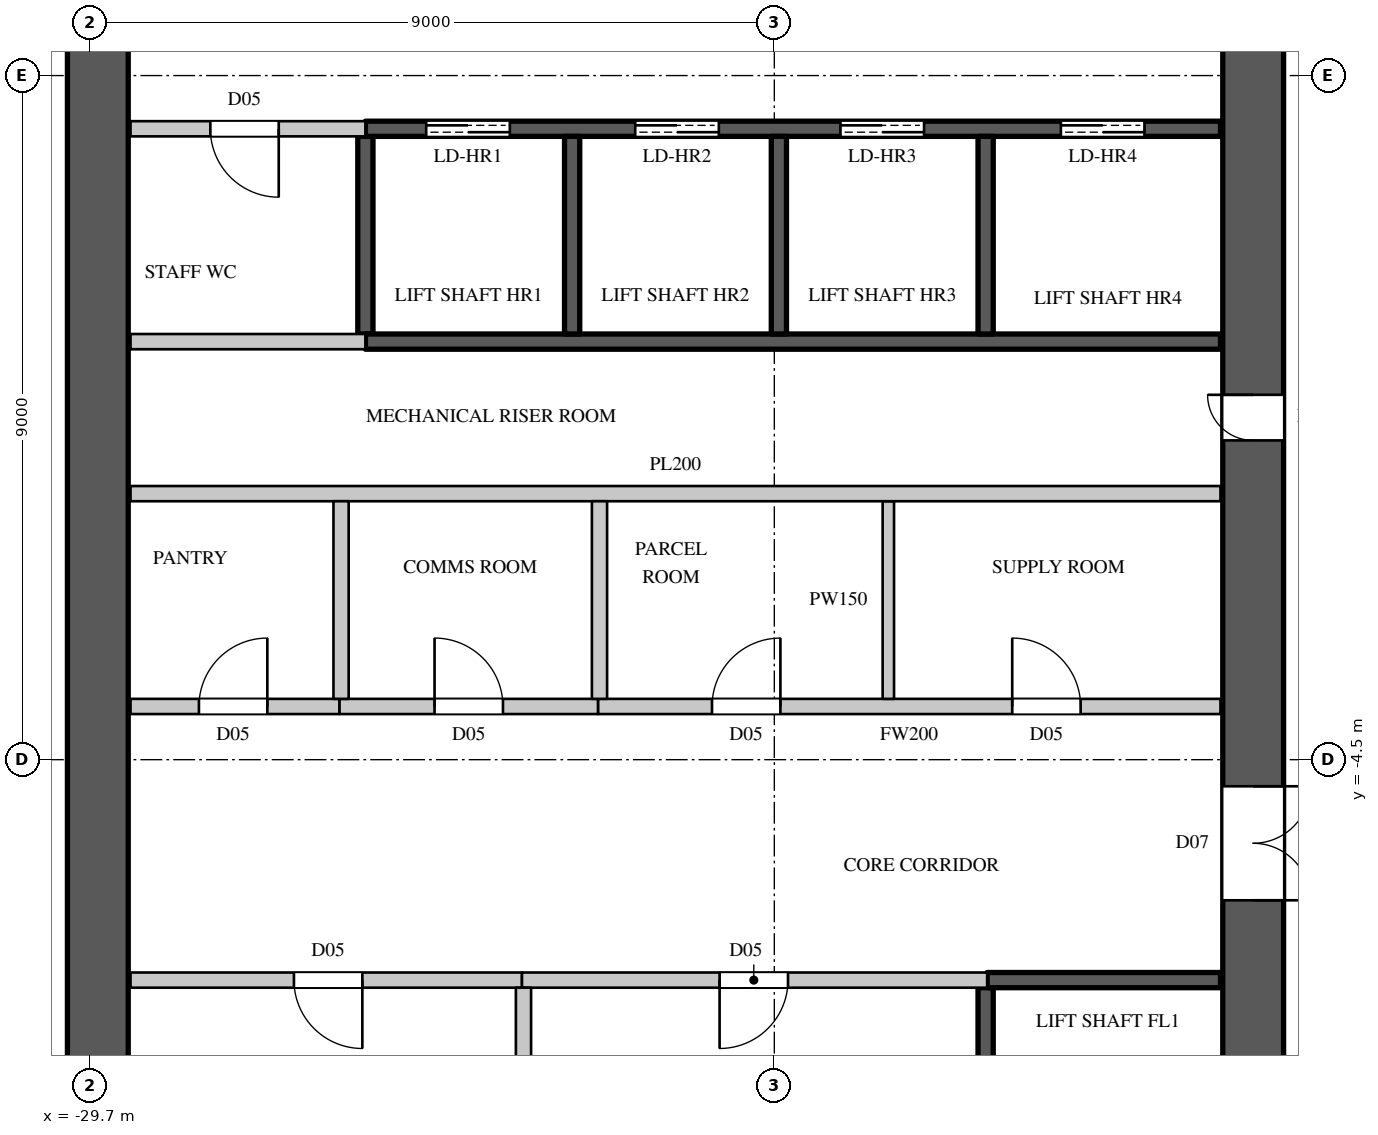
"""IFC4 building model, lengths in metres.
Left out: names, types, materials, properties, quantities, classifications, styles, units other than length and angle.
Written with IfcOpenShell. Run it as: python <this file> out.ifc"""

import sys

from ifc_helpers import new_model, si_unit, direction, frame, frame_2d, origin, place, context, subcontext, project, spatial, rectangle, extrude, element, fill, save


model = new_model("IFC4")
c1 = context("Model", 3, precision=1e-05, world=origin(), true_north=direction((0.0, 1.0)))
c2 = subcontext(c1, "Body", "Model", "MODEL_VIEW")
j1 = project(units=[si_unit("LENGTHUNIT", "METRE"), si_unit("PLANEANGLEUNIT", "RADIAN")], contexts=[c1])
p1 = place(None, origin())
s1 = spatial("IfcSite", under=j1, at=p1, CompositionType="ELEMENT")
p2 = place(p1, origin())
s2 = spatial("IfcBuilding", under=s1, at=p2, CompositionType="ELEMENT")
p3 = place(p2, frame((0.0, 0.0, 189.2)))
s3 = spatial("IfcBuildingStorey", under=s2, at=p3, CompositionType="ELEMENT", Elevation=189.2)
p4 = place(p3, frame((-14.4, -14.8, 0.0), z_axis=(0.0, 0.0, 1.0), x_axis=(0.0, 1.0, 0.0)))
e1 = element("IfcWall", 1, at=p4, inside=s3, PredefinedType="SHEAR", context=c2, shape_type="SweptSolid", body=[
    extrude(rectangle(XDim=29.6, YDim=0.8, at=frame_2d((14.8, 0.0))), origin(), (0.0, 0.0, 1.0), 4.1),
])
p5 = place(p4, frame((1.55, 0.0, 0.0)))
e2 = element("IfcOpeningElement", 2, at=p5, cuts=e1, PredefinedType="OPENING", context=c2, shape_type="SweptSolid", body=[
    extrude(rectangle(XDim=1.5, YDim=2.4, at=frame_2d((0.75, 1.2))), frame((0.0, 0.41, 0.0), z_axis=(0.0, -1.0, 0.0), x_axis=(1.0, 0.0, 0.0)), (0.0, 0.0, 1.0), 0.82),
])
p6 = place(p4, frame((26.55, 0.0, 0.0)))
e3 = element("IfcOpeningElement", 3, at=p6, cuts=e1, PredefinedType="OPENING", context=c2, shape_type="SweptSolid", body=[
    extrude(rectangle(XDim=1.5, YDim=2.4, at=frame_2d((0.75, 1.2))), frame((0.0, 0.41, 0.0), z_axis=(0.0, -1.0, 0.0), x_axis=(1.0, 0.0, 0.0)), (0.0, 0.0, 1.0), 0.82),
])
p7 = place(p4, frame((8.45, 0.0, 0.0)))
e4 = element("IfcOpeningElement", 4, at=p7, cuts=e1, PredefinedType="OPENING", context=c2, shape_type="SweptSolid", body=[
    extrude(rectangle(XDim=1.5, YDim=2.4, at=frame_2d((0.75, 1.2))), frame((0.0, 0.41, 0.0), z_axis=(0.0, -1.0, 0.0), x_axis=(1.0, 0.0, 0.0)), (0.0, 0.0, 1.0), 0.82),
])
p8 = place(p4, frame((19.65, 0.0, 0.0)))
e5 = element("IfcOpeningElement", 5, at=p8, cuts=e1, PredefinedType="OPENING", context=c2, shape_type="SweptSolid", body=[
    extrude(rectangle(XDim=1.5, YDim=2.4, at=frame_2d((0.75, 1.2))), frame((0.0, 0.41, 0.0), z_axis=(0.0, -1.0, 0.0), x_axis=(1.0, 0.0, 0.0)), (0.0, 0.0, 1.0), 0.82),
])
p9 = place(p4, frame((14.5, 0.0, 0.0)))
e6 = element("IfcOpeningElement", 6, at=p9, cuts=e1, PredefinedType="OPENING", context=c2, shape_type="SweptSolid", body=[
    extrude(rectangle(XDim=0.6, YDim=2.0, at=frame_2d((0.3, 1.0))), frame((0.0, 0.41, 0.0), z_axis=(0.0, -1.0, 0.0), x_axis=(1.0, 0.0, 0.0)), (0.0, 0.0, 1.0), 0.82),
])
p10 = place(p3, frame((-29.6, -10.2, 0.0), z_axis=(0.0, 0.0, 1.0), x_axis=(0.0, 1.0, 0.0)))
e7 = element("IfcWall", 7, at=p10, inside=s3, PredefinedType="SHEAR", context=c2, shape_type="SweptSolid", body=[
    extrude(rectangle(XDim=20.4, YDim=0.8, at=frame_2d((10.2, 0.0))), origin(), (0.0, 0.0, 1.0), 4.1),
])
p11 = place(p3, frame((-29.17, -7.4, 0.0), z_axis=(0.0, 0.0, 1.0), x_axis=(1.0, 0.0, 0.0)))
e8 = element("IfcWall", 8, at=p11, inside=s3, PredefinedType="PARTITIONING", context=c2, shape_type="SweptSolid", body=[
    extrude(rectangle(XDim=5.15, YDim=0.2, at=frame_2d((2.575, 0.0))), origin(), (0.0, 0.0, 1.0), 3.8),
])
p12 = place(p11, frame((2.15, 0.0, 0.0)))
e9 = element("IfcOpeningElement", 9, at=p12, cuts=e8, PredefinedType="OPENING", context=c2, shape_type="SweptSolid", body=[
    extrude(rectangle(XDim=0.9, YDim=2.2, at=frame_2d((0.45, 1.1))), frame((0.0, 0.11, 0.0), z_axis=(0.0, -1.0, 0.0), x_axis=(1.0, 0.0, 0.0)), (0.0, 0.0, 1.0), 0.22),
])
p13 = place(p3, frame((-29.17, -3.8, 0.0), z_axis=(0.0, 0.0, 1.0), x_axis=(1.0, 0.0, 0.0)))
e10 = element("IfcWall", 10, at=p13, inside=s3, PredefinedType="PARTITIONING", context=c2, shape_type="SweptSolid", body=[
    extrude(rectangle(XDim=2.75, YDim=0.2, at=frame_2d((1.375, 0.0))), origin(), (0.0, 0.0, 1.0), 3.8),
])
p14 = place(p13, frame((0.9, 0.0, 0.0)))
e11 = element("IfcOpeningElement", 11, at=p14, cuts=e10, PredefinedType="OPENING", context=c2, shape_type="SweptSolid", body=[
    extrude(rectangle(XDim=0.9, YDim=2.2, at=frame_2d((0.45, 1.1))), frame((0.0, 0.11, 0.0), z_axis=(0.0, -1.0, 0.0), x_axis=(1.0, 0.0, 0.0)), (0.0, 0.0, 1.0), 0.22),
])
p15 = place(p3, frame((-29.17, 3.8, 0.0), z_axis=(0.0, 0.0, 1.0), x_axis=(1.0, 0.0, 0.0)))
e12 = element("IfcWall", 12, at=p15, inside=s3, PredefinedType="PARTITIONING", context=c2, shape_type="SweptSolid", body=[
    extrude(rectangle(XDim=3.09, YDim=0.2, at=frame_2d((1.545, 0.0))), origin(), (0.0, 0.0, 1.0), 3.8),
])
p16 = place(p15, frame((1.05, 0.0, 0.0)))
e13 = element("IfcOpeningElement", 13, at=p16, cuts=e12, PredefinedType="OPENING", context=c2, shape_type="SweptSolid", body=[
    extrude(rectangle(XDim=0.9, YDim=2.2, at=frame_2d((0.45, 1.1))), frame((0.0, 0.11, 0.0), z_axis=(0.0, -1.0, 0.0), x_axis=(1.0, 0.0, 0.0)), (0.0, 0.0, 1.0), 0.22),
])
p17 = place(p3, frame((-23.02, -3.8, 0.0), z_axis=(0.0, 0.0, 1.0), x_axis=(1.0, 0.0, 0.0)))
e14 = element("IfcWall", 14, at=p17, inside=s3, PredefinedType="PARTITIONING", context=c2, shape_type="SweptSolid", body=[
    extrude(rectangle(XDim=8.19, YDim=0.2, at=frame_2d((4.095, 0.0))), origin(), (0.0, 0.0, 1.0), 3.8),
])
p18 = place(p17, frame((1.5, 0.0, 0.0)))
e15 = element("IfcOpeningElement", 15, at=p18, cuts=e14, PredefinedType="OPENING", context=c2, shape_type="SweptSolid", body=[
    extrude(rectangle(XDim=0.9, YDim=2.2, at=frame_2d((0.45, 1.1))), frame((0.0, 0.11, 0.0), z_axis=(0.0, -1.0, 0.0), x_axis=(1.0, 0.0, 0.0)), (0.0, 0.0, 1.0), 0.22),
])
p19 = place(p17, frame((5.45, 0.0, 0.0)))
e16 = element("IfcOpeningElement", 16, at=p19, cuts=e14, PredefinedType="OPENING", context=c2, shape_type="SweptSolid", body=[
    extrude(rectangle(XDim=0.9, YDim=2.2, at=frame_2d((0.45, 1.1))), frame((0.0, 0.11, 0.0), z_axis=(0.0, -1.0, 0.0), x_axis=(1.0, 0.0, 0.0)), (0.0, 0.0, 1.0), 0.22),
])
p20 = place(p3, frame((-19.2, -3.7, 0.0), z_axis=(0.0, 0.0, 1.0), x_axis=(0.0, 1.0, 0.0)))
e17 = element("IfcWall", 17, at=p20, inside=s3, PredefinedType="PARTITIONING", context=c2, shape_type="SweptSolid", body=[
    extrude(rectangle(XDim=2.6, YDim=0.15, at=frame_2d((1.3, 0.0))), origin(), (0.0, 0.0, 1.0), 3.8),
])
p21 = place(p3, frame((-29.17, -1.0, 0.0), z_axis=(0.0, 0.0, 1.0), x_axis=(1.0, 0.0, 0.0)))
e18 = element("IfcWall", 18, at=p21, inside=s3, PredefinedType="PARTITIONING", context=c2, shape_type="SweptSolid", body=[
    extrude(rectangle(XDim=14.34, YDim=0.2, at=frame_2d((7.17, 0.0))), origin(), (0.0, 0.0, 1.0), 3.8),
])
p22 = place(p3, frame((-29.17, 1.0, 0.0), z_axis=(0.0, 0.0, 1.0), x_axis=(1.0, 0.0, 0.0)))
e19 = element("IfcWall", 19, at=p22, inside=s3, PredefinedType="PARTITIONING", context=c2, shape_type="SweptSolid", body=[
    extrude(rectangle(XDim=3.09, YDim=0.2, at=frame_2d((1.545, 0.0))), origin(), (0.0, 0.0, 1.0), 3.8),
])
p23 = place(p3, frame((-26.42, -3.8, 0.0), z_axis=(0.0, 0.0, 1.0), x_axis=(1.0, 0.0, 0.0)))
e20 = element("IfcWall", 20, at=p23, inside=s3, PredefinedType="PARTITIONING", context=c2, shape_type="SweptSolid", body=[
    extrude(rectangle(XDim=3.4, YDim=0.2, at=frame_2d((1.7, 0.0))), origin(), (0.0, 0.0, 1.0), 3.8),
])
p24 = place(p23, frame((1.25, 0.0, 0.0)))
e21 = element("IfcOpeningElement", 21, at=p24, cuts=e20, PredefinedType="OPENING", context=c2, shape_type="SweptSolid", body=[
    extrude(rectangle(XDim=0.9, YDim=2.2, at=frame_2d((0.45, 1.1))), frame((0.0, 0.11, 0.0), z_axis=(0.0, -1.0, 0.0), x_axis=(1.0, 0.0, 0.0)), (0.0, 0.0, 1.0), 0.22),
])
p25 = place(p3, frame((-26.4, -3.7, 0.0), z_axis=(0.0, 0.0, 1.0), x_axis=(0.0, 1.0, 0.0)))
e22 = element("IfcWall", 22, at=p25, inside=s3, PredefinedType="PARTITIONING", context=c2, shape_type="SweptSolid", body=[
    extrude(rectangle(XDim=2.6, YDim=0.2, at=frame_2d((1.3, 0.0))), origin(), (0.0, 0.0, 1.0), 3.8),
])
p26 = place(p3, frame((-24.02, -7.4, 0.0), z_axis=(0.0, 0.0, 1.0), x_axis=(1.0, 0.0, 0.0)))
e23 = element("IfcWall", 23, at=p26, inside=s3, PredefinedType="PARTITIONING", context=c2, shape_type="SweptSolid", body=[
    extrude(rectangle(XDim=6.12, YDim=0.2, at=frame_2d((3.06, 0.0))), origin(), (0.0, 0.0, 1.0), 3.8),
])
p27 = place(p26, frame((2.6, 0.0, 0.0)))
e24 = element("IfcOpeningElement", 24, at=p27, cuts=e23, PredefinedType="OPENING", context=c2, shape_type="SweptSolid", body=[
    extrude(rectangle(XDim=0.9, YDim=2.2, at=frame_2d((0.45, 1.1))), frame((0.0, 0.11, 0.0), z_axis=(0.0, -1.0, 0.0), x_axis=(1.0, 0.0, 0.0)), (0.0, 0.0, 1.0), 0.22),
])
p28 = place(p3, frame((-24.0, -10.075, 0.0), z_axis=(0.0, 0.0, 1.0), x_axis=(0.0, 1.0, 0.0)))
e25 = element("IfcWall", 25, at=p28, inside=s3, PredefinedType="PARTITIONING", context=c2, shape_type="SweptSolid", body=[
    extrude(rectangle(XDim=2.575, YDim=0.2, at=frame_2d((1.288, 0.0))), origin(), (0.0, 0.0, 1.0), 3.8),
])
p29 = place(p3, frame((-23.0, -3.7, 0.0), z_axis=(0.0, 0.0, 1.0), x_axis=(0.0, 1.0, 0.0)))
e26 = element("IfcWall", 26, at=p29, inside=s3, PredefinedType="PARTITIONING", context=c2, shape_type="SweptSolid", body=[
    extrude(rectangle(XDim=2.6, YDim=0.2, at=frame_2d((1.3, 0.0))), origin(), (0.0, 0.0, 1.0), 3.8),
])
p30 = place(p3, frame((-26.08, 1.1, 0.0), z_axis=(0.0, 0.0, 1.0), x_axis=(0.0, 1.0, 0.0)))
e27 = element("IfcWall", 27, at=p30, inside=s3, PredefinedType="SHEAR", context=c2, shape_type="SweptSolid", body=[
    extrude(rectangle(XDim=2.6, YDim=0.2, at=frame_2d((1.3, 0.0))), origin(), (0.0, 0.0, 1.0), 3.8),
])
p31 = place(p3, frame((-26.08, 1.0, 0.0), z_axis=(0.0, 0.0, 1.0), x_axis=(1.0, 0.0, 0.0)))
e28 = element("IfcWall", 28, at=p31, inside=s3, PredefinedType="SHEAR", context=c2, shape_type="SweptSolid", body=[
    extrude(rectangle(XDim=11.25, YDim=0.2, at=frame_2d((5.625, 0.0))), origin(), (0.0, 0.0, 1.0), 3.8),
])
p32 = place(p3, frame((-26.08, 3.8, 0.0), z_axis=(0.0, 0.0, 1.0), x_axis=(1.0, 0.0, 0.0)))
e29 = element("IfcWall", 29, at=p32, inside=s3, PredefinedType="SHEAR", context=c2, shape_type="SweptSolid", body=[
    extrude(rectangle(XDim=11.25, YDim=0.2, at=frame_2d((5.625, 0.0))), origin(), (0.0, 0.0, 1.0), 3.8),
])
p33 = place(p32, frame((0.8, 0.0, 0.0)))
e30 = element("IfcOpeningElement", 30, at=p33, cuts=e29, PredefinedType="OPENING", context=c2, shape_type="SweptSolid", body=[
    extrude(rectangle(XDim=1.1, YDim=2.2, at=frame_2d((0.55, 1.1))), frame((0.0, 0.11, 0.0), z_axis=(0.0, -1.0, 0.0), x_axis=(1.0, 0.0, 0.0)), (0.0, 0.0, 1.0), 0.22),
])
p34 = place(p32, frame((3.55, 0.0, 0.0)))
e31 = element("IfcOpeningElement", 31, at=p34, cuts=e29, PredefinedType="OPENING", context=c2, shape_type="SweptSolid", body=[
    extrude(rectangle(XDim=1.1, YDim=2.2, at=frame_2d((0.55, 1.1))), frame((0.0, 0.11, 0.0), z_axis=(0.0, -1.0, 0.0), x_axis=(1.0, 0.0, 0.0)), (0.0, 0.0, 1.0), 0.22),
])
p35 = place(p32, frame((6.25, 0.0, 0.0)))
e32 = element("IfcOpeningElement", 32, at=p35, cuts=e29, PredefinedType="OPENING", context=c2, shape_type="SweptSolid", body=[
    extrude(rectangle(XDim=1.1, YDim=2.2, at=frame_2d((0.55, 1.1))), frame((0.0, 0.11, 0.0), z_axis=(0.0, -1.0, 0.0), x_axis=(1.0, 0.0, 0.0)), (0.0, 0.0, 1.0), 0.22),
])
p36 = place(p32, frame((9.15, 0.0, 0.0)))
e33 = element("IfcOpeningElement", 33, at=p36, cuts=e29, PredefinedType="OPENING", context=c2, shape_type="SweptSolid", body=[
    extrude(rectangle(XDim=1.1, YDim=2.2, at=frame_2d((0.55, 1.1))), frame((0.0, 0.11, 0.0), z_axis=(0.0, -1.0, 0.0), x_axis=(1.0, 0.0, 0.0)), (0.0, 0.0, 1.0), 0.22),
])
for number, where, z_axis, x_axis in (
    (34, (-23.36, 1.1, 0.0), (0.0, 0.0, 1.0), (0.0, 1.0, 0.0)),
    (35, (-20.64, 1.1, 0.0), (0.0, 0.0, 1.0), (0.0, 1.0, 0.0)),
):
    element("IfcWall", number, at=place(p3, frame(where, z_axis=z_axis, x_axis=x_axis)), inside=s3, PredefinedType="SHEAR", context=c2, shape_type="SweptSolid", body=[
        extrude(rectangle(XDim=2.6, YDim=0.2, at=frame_2d((1.3, 0.0))), origin(), (0.0, 0.0, 1.0), 4.1),
    ])
p37 = place(p3, frame((-17.92, -10.1, 0.0), z_axis=(0.0, 0.0, 1.0), x_axis=(0.0, 1.0, 0.0)))
e36 = element("IfcWall", 36, at=p37, inside=s3, PredefinedType="SHEAR", context=c2, shape_type="SweptSolid", body=[
    extrude(rectangle(XDim=2.6, YDim=0.2, at=frame_2d((1.3, 0.0))), origin(), (0.0, 0.0, 1.0), 3.8),
])
p38 = place(p3, frame((-17.9, -7.4, 0.0), z_axis=(0.0, 0.0, 1.0), x_axis=(1.0, 0.0, 0.0)))
e37 = element("IfcWall", 37, at=p38, inside=s3, PredefinedType="SHEAR", context=c2, shape_type="SweptSolid", body=[
    extrude(rectangle(XDim=3.07, YDim=0.2, at=frame_2d((1.535, 0.0))), origin(), (0.0, 0.0, 1.0), 3.8),
])
p39 = place(p3, frame((-17.92, 1.1, 0.0), z_axis=(0.0, 0.0, 1.0), x_axis=(0.0, 1.0, 0.0)))
e38 = element("IfcWall", 38, at=p39, inside=s3, PredefinedType="SHEAR", context=c2, shape_type="SweptSolid", body=[
    extrude(rectangle(XDim=2.6, YDim=0.2, at=frame_2d((1.3, 0.0))), origin(), (0.0, 0.0, 1.0), 4.1),
])
p40 = place(p12, origin())
e39 = element("IfcDoor", 39, at=p40, inside=s3, OperationType="SINGLE_SWING_LEFT", PredefinedType="DOOR", context=c2, shape_type="SweptSolid", body=[
    extrude(rectangle(XDim=0.9, YDim=2.2, at=frame_2d((0.45, 1.1))), frame((0.0, 0.025, 0.0), z_axis=(0.0, -1.0, 0.0), x_axis=(1.0, 0.0, 0.0)), (0.0, 0.0, 1.0), 0.05),
])
fill(e9, e39)
p41 = place(p27, origin())
e40 = element("IfcDoor", 40, at=p41, inside=s3, OperationType="SINGLE_SWING_RIGHT", PredefinedType="DOOR", context=c2, shape_type="SweptSolid", body=[
    extrude(rectangle(XDim=0.9, YDim=2.2, at=frame_2d((0.45, 1.1))), frame((0.0, 0.025, 0.0), z_axis=(0.0, -1.0, 0.0), x_axis=(1.0, 0.0, 0.0)), (0.0, 0.0, 1.0), 0.05),
])
fill(e24, e40)
p42 = place(p14, origin())
e41 = element("IfcDoor", 41, at=p42, inside=s3, OperationType="SINGLE_SWING_RIGHT", PredefinedType="DOOR", context=c2, shape_type="SweptSolid", body=[
    extrude(rectangle(XDim=0.9, YDim=2.2, at=frame_2d((0.45, 1.1))), frame((0.0, 0.025, 0.0), z_axis=(0.0, -1.0, 0.0), x_axis=(1.0, 0.0, 0.0)), (0.0, 0.0, 1.0), 0.05),
])
fill(e11, e41)
p43 = place(p24, origin())
e42 = element("IfcDoor", 42, at=p43, inside=s3, OperationType="SINGLE_SWING_LEFT", PredefinedType="DOOR", context=c2, shape_type="SweptSolid", body=[
    extrude(rectangle(XDim=0.9, YDim=2.2, at=frame_2d((0.45, 1.1))), frame((0.0, 0.025, 0.0), z_axis=(0.0, -1.0, 0.0), x_axis=(1.0, 0.0, 0.0)), (0.0, 0.0, 1.0), 0.05),
])
fill(e21, e42)
p44 = place(p18, origin())
e43 = element("IfcDoor", 43, at=p44, inside=s3, OperationType="SINGLE_SWING_RIGHT", PredefinedType="DOOR", context=c2, shape_type="SweptSolid", body=[
    extrude(rectangle(XDim=0.9, YDim=2.2, at=frame_2d((0.45, 1.1))), frame((0.0, 0.025, 0.0), z_axis=(0.0, -1.0, 0.0), x_axis=(1.0, 0.0, 0.0)), (0.0, 0.0, 1.0), 0.05),
])
fill(e15, e43)
p45 = place(p19, origin())
e44 = element("IfcDoor", 44, at=p45, inside=s3, OperationType="SINGLE_SWING_LEFT", PredefinedType="DOOR", context=c2, shape_type="SweptSolid", body=[
    extrude(rectangle(XDim=0.9, YDim=2.2, at=frame_2d((0.45, 1.1))), frame((0.0, 0.025, 0.0), z_axis=(0.0, -1.0, 0.0), x_axis=(1.0, 0.0, 0.0)), (0.0, 0.0, 1.0), 0.05),
])
fill(e16, e44)
p46 = place(p16, origin())
e45 = element("IfcDoor", 45, at=p46, inside=s3, OperationType="SINGLE_SWING_LEFT", PredefinedType="DOOR", context=c2, shape_type="SweptSolid", body=[
    extrude(rectangle(XDim=0.9, YDim=2.2, at=frame_2d((0.45, 1.1))), frame((0.0, 0.025, 0.0), z_axis=(0.0, -1.0, 0.0), x_axis=(1.0, 0.0, 0.0)), (0.0, 0.0, 1.0), 0.05),
])
fill(e13, e45)
p47 = place(p33, origin())
e46 = element("IfcDoor", 46, at=p47, inside=s3, OperationType="DOUBLE_DOOR_SLIDING", PredefinedType="DOOR", context=c2, shape_type="SweptSolid", body=[
    extrude(rectangle(XDim=1.1, YDim=2.2, at=frame_2d((0.55, 1.1))), frame((0.0, 0.025, 0.0), z_axis=(0.0, -1.0, 0.0), x_axis=(1.0, 0.0, 0.0)), (0.0, 0.0, 1.0), 0.05),
])
fill(e30, e46)
p48 = place(p34, origin())
e47 = element("IfcDoor", 47, at=p48, inside=s3, OperationType="DOUBLE_DOOR_SLIDING", PredefinedType="DOOR", context=c2, shape_type="SweptSolid", body=[
    extrude(rectangle(XDim=1.1, YDim=2.2, at=frame_2d((0.55, 1.1))), frame((0.0, 0.025, 0.0), z_axis=(0.0, -1.0, 0.0), x_axis=(1.0, 0.0, 0.0)), (0.0, 0.0, 1.0), 0.05),
])
fill(e31, e47)
p49 = place(p35, origin())
e48 = element("IfcDoor", 48, at=p49, inside=s3, OperationType="DOUBLE_DOOR_SLIDING", PredefinedType="DOOR", context=c2, shape_type="SweptSolid", body=[
    extrude(rectangle(XDim=1.1, YDim=2.2, at=frame_2d((0.55, 1.1))), frame((0.0, 0.025, 0.0), z_axis=(0.0, -1.0, 0.0), x_axis=(1.0, 0.0, 0.0)), (0.0, 0.0, 1.0), 0.05),
])
fill(e32, e48)
p50 = place(p36, origin())
e49 = element("IfcDoor", 49, at=p50, inside=s3, OperationType="DOUBLE_DOOR_SLIDING", PredefinedType="DOOR", context=c2, shape_type="SweptSolid", body=[
    extrude(rectangle(XDim=1.1, YDim=2.2, at=frame_2d((0.55, 1.1))), frame((0.0, 0.025, 0.0), z_axis=(0.0, -1.0, 0.0), x_axis=(1.0, 0.0, 0.0)), (0.0, 0.0, 1.0), 0.05),
])
fill(e33, e49)
p51 = place(p7, origin())
e50 = element("IfcDoor", 50, at=p51, inside=s3, OperationType="DOUBLE_DOOR_SINGLE_SWING", PredefinedType="DOOR", context=c2, shape_type="SweptSolid", body=[
    extrude(rectangle(XDim=1.5, YDim=2.4, at=frame_2d((0.75, 1.2))), frame((0.0, -0.345, 0.0), z_axis=(0.0, -1.0, 0.0), x_axis=(1.0, 0.0, 0.0)), (0.0, 0.0, 1.0), 0.05),
])
fill(e4, e50)
p52 = place(p9, origin())
e51 = element("IfcDoor", 51, at=p52, inside=s3, OperationType="SINGLE_SWING_RIGHT", PredefinedType="DOOR", context=c2, shape_type="SweptSolid", body=[
    extrude(rectangle(XDim=0.6, YDim=2.0, at=frame_2d((0.3, 1.0))), frame((0.0, 0.395, 0.0), z_axis=(0.0, -1.0, 0.0), x_axis=(1.0, 0.0, 0.0)), (0.0, 0.0, 1.0), 0.05),
])
fill(e6, e51)
save(model, sys.argv[1])
